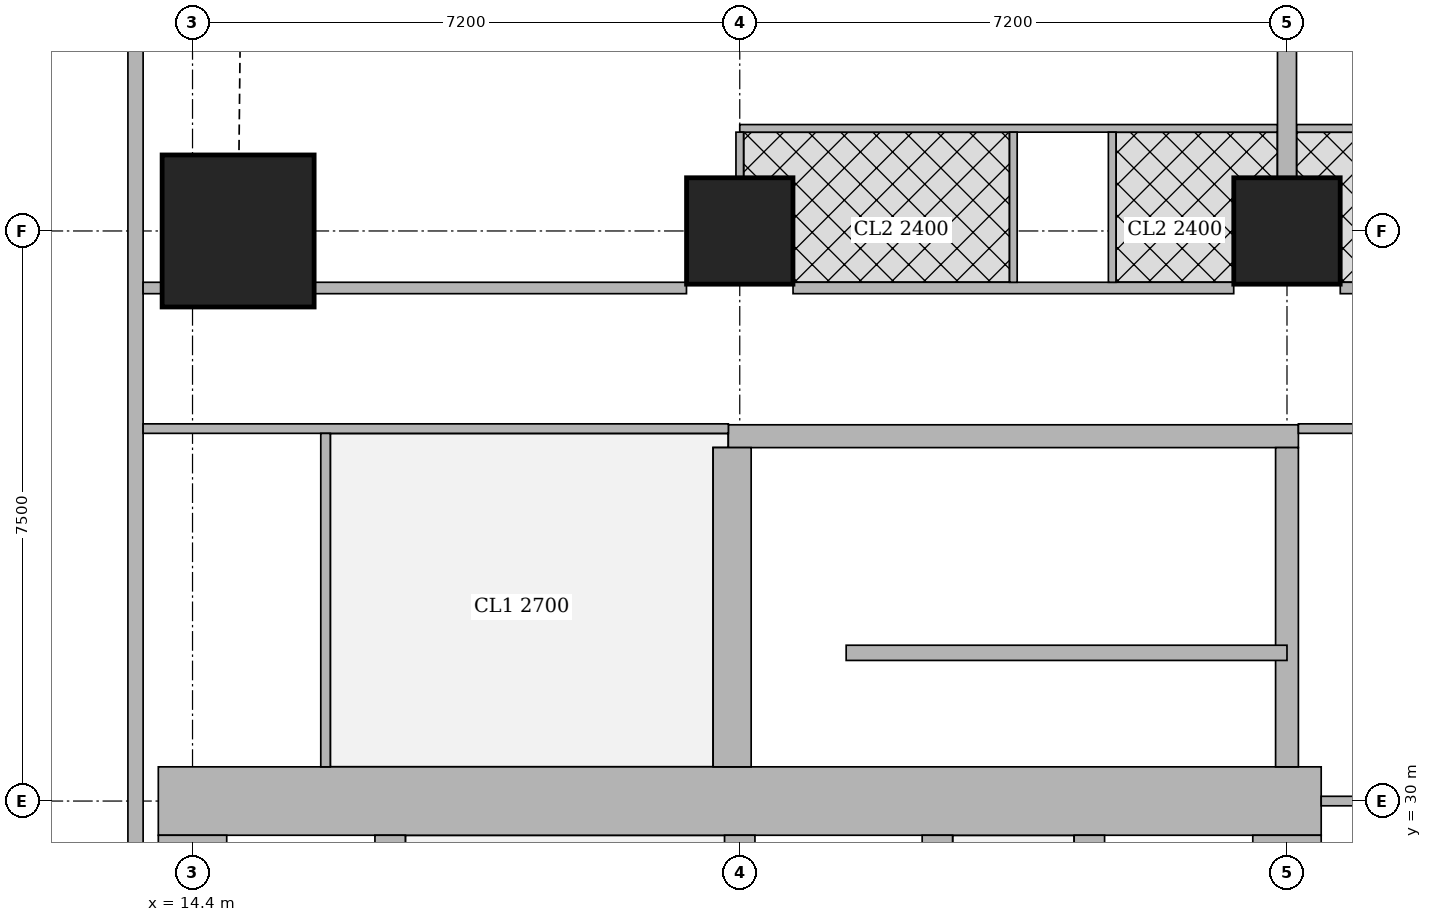
"""IFC4 building model, lengths in metres.
Left out: names, types, materials, properties, quantities, classifications, styles, units other than length and angle.
Written with IfcOpenShell. Run it as: python <this file> out.ifc"""

import sys

from ifc_helpers import new_model, si_unit, direction, frame, frame_2d, origin, origin_2d, place, context, subcontext, project, spatial, rectangle, extrude, element, fill, save


model = new_model("IFC4")
c1 = context("Model", 3, precision=1e-05, world=origin(), true_north=direction((0.0, 1.0)))
c2 = subcontext(c1, "Body", "Model", "MODEL_VIEW")
j1 = project(units=[si_unit("LENGTHUNIT", "METRE"), si_unit("PLANEANGLEUNIT", "RADIAN")], contexts=[c1])
p1 = place(None, origin())
s1 = spatial("IfcSite", under=j1, at=p1, CompositionType="ELEMENT")
p2 = place(p1, origin())
s2 = spatial("IfcBuilding", under=s1, at=p2, CompositionType="ELEMENT")
p3 = place(p2, frame((0.0, 0.0, 274.1)))
s3 = spatial("IfcBuildingStorey", under=s2, at=p3, CompositionType="ELEMENT", Elevation=274.1)
p4 = place(p3, frame((15.0, 37.5, 0.0), z_axis=(0.0, 0.0, 1.0), x_axis=(1.0, 0.0, 0.0)))
e1 = element("IfcColumn", 1, at=p4, inside=s3, PredefinedType="COLUMN", context=c2, shape_type="SweptSolid", body=[
    extrude(rectangle(XDim=2.0, YDim=2.0, at=origin_2d()), origin(), (0.0, 0.0, 1.0), 3.75),
])
for number, where, z_axis, x_axis in (
    (2, (21.6, 37.5, 0.0), (0.0, 0.0, 1.0), (1.0, 0.0, 0.0)),
    (3, (28.8, 37.5, 0.0), (0.0, 0.0, 1.0), (1.0, 0.0, 0.0)),
):
    element("IfcColumn", number, at=place(p3, frame(where, z_axis=z_axis, x_axis=x_axis)), inside=s3, PredefinedType="COLUMN", context=c2, shape_type="SweptSolid", body=[
        extrude(rectangle(XDim=1.4, YDim=1.4, at=origin_2d()), origin(), (0.0, 0.0, 1.0), 3.75),
    ])
p5 = place(p3, frame((13.95, 30.0, 0.0), z_axis=(0.0, 0.0, 1.0), x_axis=(1.0, 0.0, 0.0)))
e4 = element("IfcWall", 4, at=p5, inside=s3, PredefinedType="SHEAR", context=c2, shape_type="SweptSolid", body=[
    extrude(rectangle(XDim=15.3, YDim=0.9, at=frame_2d((7.65, 0.0))), origin(), (0.0, 0.0, 1.0), 3.75),
])
p6 = place(p5, frame((4.45, 0.0, 0.0)))
e5 = element("IfcOpeningElement", 5, at=p6, cuts=e4, PredefinedType="OPENING", context=c2, shape_type="SweptSolid", body=[
    extrude(rectangle(XDim=1.8, YDim=2.1, at=frame_2d((0.9, 1.05))), frame((0.0, 0.46, 0.0), z_axis=(0.0, -1.0, 0.0), x_axis=(1.0, 0.0, 0.0)), (0.0, 0.0, 1.0), 0.92),
])
p7 = place(p5, frame((10.7, 0.0, 0.0)))
e6 = element("IfcOpeningElement", 6, at=p7, cuts=e4, PredefinedType="OPENING", context=c2, shape_type="SweptSolid", body=[
    extrude(rectangle(XDim=1.1, YDim=2.1, at=frame_2d((0.55, 1.05))), frame((0.0, 0.46, 0.0), z_axis=(0.0, -1.0, 0.0), x_axis=(1.0, 0.0, 0.0)), (0.0, 0.0, 1.0), 0.92),
])
for number, where, z_axis, x_axis in (
    (7, (14.4, 15.45, 0.0), (0.0, 0.0, 1.0), (0.0, 1.0, 0.0)),
    (8, (28.8, 15.45, 0.0), (0.0, 0.0, 1.0), (0.0, 1.0, 0.0)),
):
    element("IfcWall", number, at=place(p3, frame(where, z_axis=z_axis, x_axis=x_axis)), inside=s3, PredefinedType="SHEAR", context=c2, shape_type="SweptSolid", body=[
        extrude(rectangle(XDim=14.1, YDim=0.9, at=frame_2d((7.05, 0.0))), origin(), (0.0, 0.0, 1.0), 3.75),
    ])
p8 = place(p3, frame((17.0, 15.45, 0.0), z_axis=(0.0, 0.0, 1.0), x_axis=(0.0, 1.0, 0.0)))
e9 = element("IfcWall", 9, at=p8, inside=s3, PredefinedType="SHEAR", context=c2, shape_type="SweptSolid", body=[
    extrude(rectangle(XDim=14.1, YDim=0.4, at=frame_2d((7.05, 0.0))), origin(), (0.0, 0.0, 1.0), 3.75),
])
p9 = place(p8, frame((1.05, 0.0, 0.0)))
e10 = element("IfcOpeningElement", 10, at=p9, cuts=e9, PredefinedType="OPENING", context=c2, shape_type="SweptSolid", body=[
    extrude(rectangle(XDim=1.0, YDim=2.1, at=frame_2d((0.5, 1.05))), frame((0.0, 0.21, 0.0), z_axis=(0.0, -1.0, 0.0), x_axis=(1.0, 0.0, 0.0)), (0.0, 0.0, 1.0), 0.42),
])
p10 = place(p8, frame((4.675, 0.0, 0.0)))
e11 = element("IfcOpeningElement", 11, at=p10, cuts=e9, PredefinedType="OPENING", context=c2, shape_type="SweptSolid", body=[
    extrude(rectangle(XDim=1.0, YDim=2.1, at=frame_2d((0.5, 1.05))), frame((0.0, 0.21, 0.0), z_axis=(0.0, -1.0, 0.0), x_axis=(1.0, 0.0, 0.0)), (0.0, 0.0, 1.0), 0.42),
])
p11 = place(p8, frame((8.425, 0.0, 0.0)))
e12 = element("IfcOpeningElement", 12, at=p11, cuts=e9, PredefinedType="OPENING", context=c2, shape_type="SweptSolid", body=[
    extrude(rectangle(XDim=1.0, YDim=2.1, at=frame_2d((0.5, 1.05))), frame((0.0, 0.21, 0.0), z_axis=(0.0, -1.0, 0.0), x_axis=(1.0, 0.0, 0.0)), (0.0, 0.0, 1.0), 0.42),
])
p12 = place(p8, frame((12.175, 0.0, 0.0)))
e13 = element("IfcOpeningElement", 13, at=p12, cuts=e9, PredefinedType="OPENING", context=c2, shape_type="SweptSolid", body=[
    extrude(rectangle(XDim=1.0, YDim=2.1, at=frame_2d((0.5, 1.05))), frame((0.0, 0.21, 0.0), z_axis=(0.0, -1.0, 0.0), x_axis=(1.0, 0.0, 0.0)), (0.0, 0.0, 1.0), 0.42),
])
p13 = place(p3, frame((21.6, 15.45, 0.0), z_axis=(0.0, 0.0, 1.0), x_axis=(0.0, 1.0, 0.0)))
e14 = element("IfcWall", 14, at=p13, inside=s3, PredefinedType="SHEAR", context=c2, shape_type="SweptSolid", body=[
    extrude(rectangle(XDim=14.1, YDim=0.4, at=frame_2d((7.05, 0.0))), origin(), (0.0, 0.0, 1.0), 3.75),
])
p14 = place(p13, frame((0.875, 0.0, 0.0)))
e15 = element("IfcOpeningElement", 15, at=p14, cuts=e14, PredefinedType="OPENING", context=c2, shape_type="SweptSolid", body=[
    extrude(rectangle(XDim=1.1, YDim=2.1, at=frame_2d((0.55, 1.05))), frame((0.0, 0.21, 0.0), z_axis=(0.0, -1.0, 0.0), x_axis=(1.0, 0.0, 0.0)), (0.0, 0.0, 1.0), 0.42),
])
p15 = place(p13, frame((4.625, 0.0, 0.0)))
e16 = element("IfcOpeningElement", 16, at=p15, cuts=e14, PredefinedType="OPENING", context=c2, shape_type="SweptSolid", body=[
    extrude(rectangle(XDim=1.1, YDim=2.1, at=frame_2d((0.55, 1.05))), frame((0.0, 0.21, 0.0), z_axis=(0.0, -1.0, 0.0), x_axis=(1.0, 0.0, 0.0)), (0.0, 0.0, 1.0), 0.42),
])
p16 = place(p13, frame((8.375, 0.0, 0.0)))
e17 = element("IfcOpeningElement", 17, at=p16, cuts=e14, PredefinedType="OPENING", context=c2, shape_type="SweptSolid", body=[
    extrude(rectangle(XDim=1.1, YDim=2.1, at=frame_2d((0.55, 1.05))), frame((0.0, 0.21, 0.0), z_axis=(0.0, -1.0, 0.0), x_axis=(1.0, 0.0, 0.0)), (0.0, 0.0, 1.0), 0.42),
])
p17 = place(p13, frame((12.125, 0.0, 0.0)))
e18 = element("IfcOpeningElement", 18, at=p17, cuts=e14, PredefinedType="OPENING", context=c2, shape_type="SweptSolid", body=[
    extrude(rectangle(XDim=1.1, YDim=2.1, at=frame_2d((0.55, 1.05))), frame((0.0, 0.21, 0.0), z_axis=(0.0, -1.0, 0.0), x_axis=(1.0, 0.0, 0.0)), (0.0, 0.0, 1.0), 0.42),
])
p18 = place(p3, frame((24.2, 15.45, 0.0), z_axis=(0.0, 0.0, 1.0), x_axis=(0.0, 1.0, 0.0)))
e19 = element("IfcWall", 19, at=p18, inside=s3, PredefinedType="SHEAR", context=c2, shape_type="SweptSolid", body=[
    extrude(rectangle(XDim=14.1, YDim=0.4, at=frame_2d((7.05, 0.0))), origin(), (0.0, 0.0, 1.0), 3.75),
])
p19 = place(p3, frame((26.2, 26.45, 0.0), z_axis=(0.0, 0.0, 1.0), x_axis=(0.0, 1.0, 0.0)))
e20 = element("IfcWall", 20, at=p19, inside=s3, PredefinedType="SHEAR", context=c2, shape_type="SweptSolid", body=[
    extrude(rectangle(XDim=3.1, YDim=0.4, at=frame_2d((1.55, 0.0))), origin(), (0.0, 0.0, 1.0), 3.75),
])
p20 = place(p19, frame((1.075, 0.0, 0.0)))
e21 = element("IfcOpeningElement", 21, at=p20, cuts=e20, PredefinedType="OPENING", context=c2, shape_type="SweptSolid", body=[
    extrude(rectangle(XDim=1.2, YDim=2.1, at=frame_2d((0.6, 1.05))), frame((0.0, 0.21, 0.0), z_axis=(0.0, -1.0, 0.0), x_axis=(1.0, 0.0, 0.0)), (0.0, 0.0, 1.0), 0.42),
])
p21 = place(p3, frame((21.45, 34.8, 0.0), z_axis=(0.0, 0.0, 1.0), x_axis=(1.0, 0.0, 0.0)))
e22 = element("IfcWall", 22, at=p21, inside=s3, PredefinedType="SHEAR", context=c2, shape_type="SweptSolid", body=[
    extrude(rectangle(XDim=7.5, YDim=0.3, at=frame_2d((3.75, 0.0))), origin(), (0.0, 0.0, 1.0), 3.75),
])
p22 = place(p21, frame((0.5, 0.0, 0.0)))
e23 = element("IfcOpeningElement", 23, at=p22, cuts=e22, PredefinedType="OPENING", context=c2, shape_type="SweptSolid", body=[
    extrude(rectangle(XDim=1.1, YDim=2.1, at=frame_2d((0.55, 1.05))), frame((0.0, 0.16, 0.0), z_axis=(0.0, -1.0, 0.0), x_axis=(1.0, 0.0, 0.0)), (0.0, 0.0, 1.0), 0.32),
])
p23 = place(p3, frame((21.5, 30.45, 0.0), z_axis=(0.0, 0.0, 1.0), x_axis=(0.0, 1.0, 0.0)))
e24 = element("IfcWall", 24, at=p23, inside=s3, PredefinedType="SHEAR", context=c2, shape_type="SweptSolid", body=[
    extrude(rectangle(XDim=4.2, YDim=0.5, at=frame_2d((2.1, 0.0))), origin(), (0.0, 0.0, 1.0), 3.75),
])
p24 = place(p3, frame((28.8, 30.45, 0.0), z_axis=(0.0, 0.0, 1.0), x_axis=(0.0, 1.0, 0.0)))
e25 = element("IfcWall", 25, at=p24, inside=s3, PredefinedType="SHEAR", context=c2, shape_type="SweptSolid", body=[
    extrude(rectangle(XDim=4.2, YDim=0.3, at=frame_2d((2.1, 0.0))), origin(), (0.0, 0.0, 1.0), 3.75),
])
p25 = place(p3, frame((13.65, 43.037, 0.0), z_axis=(0.0, 0.0, 1.0), x_axis=(0.0, -1.0, 0.0)))
e26 = element("IfcWall", 26, at=p25, inside=s3, PredefinedType="SOLIDWALL", context=c2, shape_type="SweptSolid", body=[
    extrude(rectangle(XDim=35.374, YDim=0.2, at=frame_2d((17.687, 0.0))), origin(), (0.0, 0.0, 1.0), 3.5),
])
p26 = place(p25, frame((1.959, 0.0, 0.9)))
e27 = element("IfcOpeningElement", 27, at=p26, cuts=e26, PredefinedType="OPENING", context=c2, shape_type="SweptSolid", body=[
    extrude(rectangle(XDim=1.8, YDim=1.5, at=frame_2d((0.9, 0.75))), frame((0.0, 0.11, 0.0), z_axis=(0.0, -1.0, 0.0), x_axis=(1.0, 0.0, 0.0)), (0.0, 0.0, 1.0), 0.22),
])
p27 = place(p3, frame((13.75, 36.75, 0.0), z_axis=(0.0, 0.0, 1.0), x_axis=(1.0, 0.0, 0.0)))
e28 = element("IfcWall", 28, at=p27, inside=s3, PredefinedType="SOLIDWALL", context=c2, shape_type="SweptSolid", body=[
    extrude(rectangle(XDim=0.249, YDim=0.15, at=frame_2d((0.125, 0.0))), origin(), (0.0, 0.0, 1.0), 3.5),
])
p28 = place(p3, frame((16.001, 36.75, 0.0), z_axis=(0.0, 0.0, 1.0), x_axis=(1.0, 0.0, 0.0)))
e29 = element("IfcWall", 29, at=p28, inside=s3, PredefinedType="SOLIDWALL", context=c2, shape_type="SweptSolid", body=[
    extrude(rectangle(XDim=4.898, YDim=0.15, at=frame_2d((2.449, 0.0))), origin(), (0.0, 0.0, 1.0), 3.5),
])
p29 = place(p28, frame((1.074, 0.0, 0.0)))
e30 = element("IfcOpeningElement", 30, at=p29, cuts=e29, PredefinedType="OPENING", context=c2, shape_type="SweptSolid", body=[
    extrude(rectangle(XDim=1.0, YDim=2.1, at=frame_2d((0.5, 1.05))), frame((0.0, 0.085, 0.0), z_axis=(0.0, -1.0, 0.0), x_axis=(1.0, 0.0, 0.0)), (0.0, 0.0, 1.0), 0.17),
])
p30 = place(p3, frame((22.301, 36.75, 0.0), z_axis=(0.0, 0.0, 1.0), x_axis=(1.0, 0.0, 0.0)))
e31 = element("IfcWall", 31, at=p30, inside=s3, PredefinedType="SOLIDWALL", context=c2, shape_type="SweptSolid", body=[
    extrude(rectangle(XDim=5.798, YDim=0.15, at=frame_2d((2.899, 0.0))), origin(), (0.0, 0.0, 1.0), 3.5),
])
p31 = place(p3, frame((29.501, 36.75, 0.0), z_axis=(0.0, 0.0, 1.0), x_axis=(1.0, 0.0, 0.0)))
e32 = element("IfcWall", 32, at=p31, inside=s3, PredefinedType="SOLIDWALL", context=c2, shape_type="SweptSolid", body=[
    extrude(rectangle(XDim=5.216, YDim=0.15, at=frame_2d((2.608, 0.0))), origin(), (0.0, 0.0, 1.0), 3.5),
])
p32 = place(p31, frame((3.305, 0.0, 0.0)))
e33 = element("IfcOpeningElement", 33, at=p32, cuts=e32, PredefinedType="OPENING", context=c2, shape_type="SweptSolid", body=[
    extrude(rectangle(XDim=1.0, YDim=2.1, at=frame_2d((0.5, 1.05))), frame((0.0, 0.085, 0.0), z_axis=(0.0, -1.0, 0.0), x_axis=(1.0, 0.0, 0.0)), (0.0, 0.0, 1.0), 0.17),
])
p33 = place(p3, frame((21.6, 38.85, 0.0), z_axis=(0.0, 0.0, 1.0), x_axis=(1.0, 0.0, 0.0)))
e34 = element("IfcWall", 34, at=p33, inside=s3, PredefinedType="PARTITIONING", context=c2, shape_type="SweptSolid", body=[
    extrude(rectangle(XDim=7.075, YDim=0.1, at=frame_2d((3.538, 0.0))), origin(), (0.0, 0.0, 1.0), 3.5),
])
p34 = place(p33, frame((1.35, 0.0, 0.0)))
e35 = element("IfcOpeningElement", 35, at=p34, cuts=e34, PredefinedType="OPENING", context=c2, shape_type="SweptSolid", body=[
    extrude(rectangle(XDim=0.9, YDim=2.1, at=frame_2d((0.45, 1.05))), frame((0.0, 0.06, 0.0), z_axis=(0.0, -1.0, 0.0), x_axis=(1.0, 0.0, 0.0)), (0.0, 0.0, 1.0), 0.12),
])
p35 = place(p33, frame((5.55, 0.0, 0.0)))
e36 = element("IfcOpeningElement", 36, at=p35, cuts=e34, PredefinedType="OPENING", context=c2, shape_type="SweptSolid", body=[
    extrude(rectangle(XDim=0.9, YDim=2.1, at=frame_2d((0.45, 1.05))), frame((0.0, 0.06, 0.0), z_axis=(0.0, -1.0, 0.0), x_axis=(1.0, 0.0, 0.0)), (0.0, 0.0, 1.0), 0.12),
])
p36 = place(p3, frame((21.6, 38.201, 0.0), z_axis=(0.0, 0.0, 1.0), x_axis=(0.0, 1.0, 0.0)))
e37 = element("IfcWall", 37, at=p36, inside=s3, PredefinedType="PARTITIONING", context=c2, shape_type="SweptSolid", body=[
    extrude(rectangle(XDim=0.599, YDim=0.1, at=frame_2d((0.3, 0.0))), origin(), (0.0, 0.0, 1.0), 3.5),
])
p37 = place(p3, frame((25.2, 36.825, 0.0), z_axis=(0.0, 0.0, 1.0), x_axis=(0.0, 1.0, 0.0)))
e38 = element("IfcWall", 38, at=p37, inside=s3, PredefinedType="PARTITIONING", context=c2, shape_type="SweptSolid", body=[
    extrude(rectangle(XDim=1.975, YDim=0.1, at=frame_2d((0.988, 0.0))), origin(), (0.0, 0.0, 1.0), 3.5),
])
p38 = place(p3, frame((26.5, 36.825, 0.0), z_axis=(0.0, 0.0, 1.0), x_axis=(0.0, 1.0, 0.0)))
e39 = element("IfcWall", 39, at=p38, inside=s3, PredefinedType="PARTITIONING", context=c2, shape_type="SweptSolid", body=[
    extrude(rectangle(XDim=1.975, YDim=0.1, at=frame_2d((0.988, 0.0))), origin(), (0.0, 0.0, 1.0), 3.5),
])
p39 = place(p38, frame((0.525, 0.0, 0.0)))
e40 = element("IfcOpeningElement", 40, at=p39, cuts=e39, PredefinedType="OPENING", context=c2, shape_type="SweptSolid", body=[
    extrude(rectangle(XDim=0.9, YDim=2.1, at=frame_2d((0.45, 1.05))), frame((0.0, 0.06, 0.0), z_axis=(0.0, -1.0, 0.0), x_axis=(1.0, 0.0, 0.0)), (0.0, 0.0, 1.0), 0.12),
])
p40 = place(p3, frame((28.925, 38.85, 0.0), z_axis=(0.0, 0.0, 1.0), x_axis=(1.0, 0.0, 0.0)))
e41 = element("IfcWall", 41, at=p40, inside=s3, PredefinedType="PARTITIONING", context=c2, shape_type="SweptSolid", body=[
    extrude(rectangle(XDim=2.879, YDim=0.1, at=frame_2d((1.439, 0.0))), origin(), (0.0, 0.0, 1.0), 3.5),
])
p41 = place(p40, frame((0.925, 0.0, 0.0)))
e42 = element("IfcOpeningElement", 42, at=p41, cuts=e41, PredefinedType="OPENING", context=c2, shape_type="SweptSolid", body=[
    extrude(rectangle(XDim=0.9, YDim=2.1, at=frame_2d((0.45, 1.05))), frame((0.0, 0.06, 0.0), z_axis=(0.0, -1.0, 0.0), x_axis=(1.0, 0.0, 0.0)), (0.0, 0.0, 1.0), 0.12),
])
p42 = place(p3, frame((28.8, 38.201, 0.0), z_axis=(0.0, 0.0, 1.0), x_axis=(0.0, 1.0, 0.0)))
e43 = element("IfcWall", 43, at=p42, inside=s3, PredefinedType="SOLIDWALL", context=c2, shape_type="SweptSolid", body=[
    extrude(rectangle(XDim=1.849, YDim=0.25, at=frame_2d((0.925, 0.0))), origin(), (0.0, 0.0, 1.0), 3.5),
])
p43 = place(p3, frame((13.75, 34.9, 0.0), z_axis=(0.0, 0.0, 1.0), x_axis=(1.0, 0.0, 0.0)))
e44 = element("IfcWall", 44, at=p43, inside=s3, PredefinedType="PARTITIONING", context=c2, shape_type="SweptSolid", body=[
    extrude(rectangle(XDim=7.7, YDim=0.125, at=frame_2d((3.85, 0.0))), origin(), (0.0, 0.0, 1.0), 3.5),
])
p44 = place(p43, frame((4.15, 0.0, 0.0)))
e45 = element("IfcOpeningElement", 45, at=p44, cuts=e44, PredefinedType="OPENING", context=c2, shape_type="SweptSolid", body=[
    extrude(rectangle(XDim=1.8, YDim=2.1, at=frame_2d((0.9, 1.05))), frame((0.0, 0.073, 0.0), z_axis=(0.0, -1.0, 0.0), x_axis=(1.0, 0.0, 0.0)), (0.0, 0.0, 1.0), 0.145),
])
p45 = place(p3, frame((16.15, 30.45, 0.0), z_axis=(0.0, 0.0, 1.0), x_axis=(0.0, 1.0, 0.0)))
e46 = element("IfcWall", 46, at=p45, inside=s3, PredefinedType="PARTITIONING", context=c2, shape_type="SweptSolid", body=[
    extrude(rectangle(XDim=4.387, YDim=0.125, at=frame_2d((2.193, 0.0))), origin(), (0.0, 0.0, 1.0), 3.5),
])
p46 = place(p45, frame((1.75, 0.0, 0.0)))
e47 = element("IfcOpeningElement", 47, at=p46, cuts=e46, PredefinedType="OPENING", context=c2, shape_type="SweptSolid", body=[
    extrude(rectangle(XDim=1.0, YDim=2.1, at=frame_2d((0.5, 1.05))), frame((0.0, 0.073, 0.0), z_axis=(0.0, -1.0, 0.0), x_axis=(1.0, 0.0, 0.0)), (0.0, 0.0, 1.0), 0.145),
])
p47 = place(p3, frame((28.95, 34.9, 0.0), z_axis=(0.0, 0.0, 1.0), x_axis=(1.0, 0.0, 0.0)))
e48 = element("IfcWall", 48, at=p47, inside=s3, PredefinedType="PARTITIONING", context=c2, shape_type="SweptSolid", body=[
    extrude(rectangle(XDim=4.334, YDim=0.125, at=frame_2d((2.167, 0.0))), origin(), (0.0, 0.0, 1.0), 3.5),
])
p48 = place(p3, frame((29.25, 30.0, 0.0), z_axis=(0.0, 0.0, 1.0), x_axis=(1.0, 0.0, 0.0)))
e49 = element("IfcWall", 49, at=p48, inside=s3, PredefinedType="PARTITIONING", context=c2, shape_type="SweptSolid", body=[
    extrude(rectangle(XDim=3.049, YDim=0.125, at=frame_2d((1.524, 0.0))), origin(), (0.0, 0.0, 1.0), 3.5),
])
p49 = place(p3, frame((23.0, 31.95, 0.0), z_axis=(0.0, 0.0, 1.0), x_axis=(1.0, 0.0, 0.0)))
e50 = element("IfcWall", 50, at=p49, inside=s3, PredefinedType="SHEAR", context=c2, shape_type="SweptSolid", body=[
    extrude(rectangle(XDim=5.8, YDim=0.2, at=frame_2d((2.9, 0.0))), origin(), (0.0, 0.0, 1.0), 3.75),
])
p50 = place(p26, origin())
e51 = element("IfcWindow", 51, at=p50, inside=s3, PartitioningType="SINGLE_PANEL", PredefinedType="WINDOW", context=c2, shape_type="SweptSolid", body=[
    extrude(rectangle(XDim=1.8, YDim=1.5, at=frame_2d((0.9, 0.75))), frame((0.0, 0.03, 0.0), z_axis=(0.0, -1.0, 0.0), x_axis=(1.0, 0.0, 0.0)), (0.0, 0.0, 1.0), 0.06),
])
fill(e27, e51)
p51 = place(p34, origin())
e52 = element("IfcDoor", 52, at=p51, inside=s3, OperationType="SINGLE_SWING_RIGHT", PredefinedType="DOOR", context=c2, shape_type="SweptSolid", body=[
    extrude(rectangle(XDim=0.9, YDim=2.1, at=frame_2d((0.45, 1.05))), frame((0.0, 0.025, 0.0), z_axis=(0.0, -1.0, 0.0), x_axis=(1.0, 0.0, 0.0)), (0.0, 0.0, 1.0), 0.05),
])
fill(e35, e52)
p52 = place(p35, origin())
e53 = element("IfcDoor", 53, at=p52, inside=s3, OperationType="SINGLE_SWING_LEFT", PredefinedType="DOOR", context=c2, shape_type="SweptSolid", body=[
    extrude(rectangle(XDim=0.9, YDim=2.1, at=frame_2d((0.45, 1.05))), frame((0.0, 0.025, 0.0), z_axis=(0.0, -1.0, 0.0), x_axis=(1.0, 0.0, 0.0)), (0.0, 0.0, 1.0), 0.05),
])
fill(e36, e53)
p53 = place(p39, origin())
e54 = element("IfcDoor", 54, at=p53, inside=s3, OperationType="SINGLE_SWING_LEFT", PredefinedType="DOOR", context=c2, shape_type="SweptSolid", body=[
    extrude(rectangle(XDim=0.9, YDim=2.1, at=frame_2d((0.45, 1.05))), frame((0.0, 0.025, 0.0), z_axis=(0.0, -1.0, 0.0), x_axis=(1.0, 0.0, 0.0)), (0.0, 0.0, 1.0), 0.05),
])
fill(e40, e54)
p54 = place(p29, origin())
e55 = element("IfcDoor", 55, at=p54, inside=s3, OperationType="SINGLE_SWING_LEFT", PredefinedType="DOOR", context=c2, shape_type="SweptSolid", body=[
    extrude(rectangle(XDim=1.0, YDim=2.1, at=frame_2d((0.5, 1.05))), frame((0.0, 0.025, 0.0), z_axis=(0.0, -1.0, 0.0), x_axis=(1.0, 0.0, 0.0)), (0.0, 0.0, 1.0), 0.05),
])
fill(e30, e55)
p55 = place(p46, origin())
e56 = element("IfcDoor", 56, at=p55, inside=s3, OperationType="SINGLE_SWING_RIGHT", PredefinedType="DOOR", context=c2, shape_type="SweptSolid", body=[
    extrude(rectangle(XDim=1.0, YDim=2.1, at=frame_2d((0.5, 1.05))), frame((0.0, 0.025, 0.0), z_axis=(0.0, -1.0, 0.0), x_axis=(1.0, 0.0, 0.0)), (0.0, 0.0, 1.0), 0.05),
])
fill(e47, e56)
p56 = place(p44, origin())
e57 = element("IfcDoor", 57, at=p56, inside=s3, OperationType="DOUBLE_DOOR_SINGLE_SWING", PredefinedType="DOOR", context=c2, shape_type="SweptSolid", body=[
    extrude(rectangle(XDim=1.8, YDim=2.1, at=frame_2d((0.9, 1.05))), frame((0.0, 0.025, 0.0), z_axis=(0.0, -1.0, 0.0), x_axis=(1.0, 0.0, 0.0)), (0.0, 0.0, 1.0), 0.05),
])
fill(e45, e57)
p57 = place(p6, origin())
e58 = element("IfcDoor", 58, at=p57, inside=s3, OperationType="DOUBLE_DOOR_SINGLE_SWING", PredefinedType="DOOR", context=c2, shape_type="SweptSolid", body=[
    extrude(rectangle(XDim=1.8, YDim=2.1, at=frame_2d((0.9, 1.05))), frame((0.0, 0.025, 0.0), z_axis=(0.0, -1.0, 0.0), x_axis=(1.0, 0.0, 0.0)), (0.0, 0.0, 1.0), 0.05),
])
fill(e5, e58)
p58 = place(p7, origin())
e59 = element("IfcDoor", 59, at=p58, inside=s3, OperationType="SINGLE_SWING_RIGHT", PredefinedType="DOOR", context=c2, shape_type="SweptSolid", body=[
    extrude(rectangle(XDim=1.1, YDim=2.1, at=frame_2d((0.55, 1.05))), frame((0.0, 0.025, 0.0), z_axis=(0.0, -1.0, 0.0), x_axis=(1.0, 0.0, 0.0)), (0.0, 0.0, 1.0), 0.05),
])
fill(e6, e59)
p59 = place(p22, origin())
e60 = element("IfcDoor", 60, at=p59, inside=s3, OperationType="SINGLE_SWING_RIGHT", PredefinedType="DOOR", context=c2, shape_type="SweptSolid", body=[
    extrude(rectangle(XDim=1.1, YDim=2.1, at=frame_2d((0.55, 1.05))), frame((0.0, 0.025, 0.0), z_axis=(0.0, -1.0, 0.0), x_axis=(1.0, 0.0, 0.0)), (0.0, 0.0, 1.0), 0.05),
])
fill(e23, e60)
save(model, sys.argv[1])
